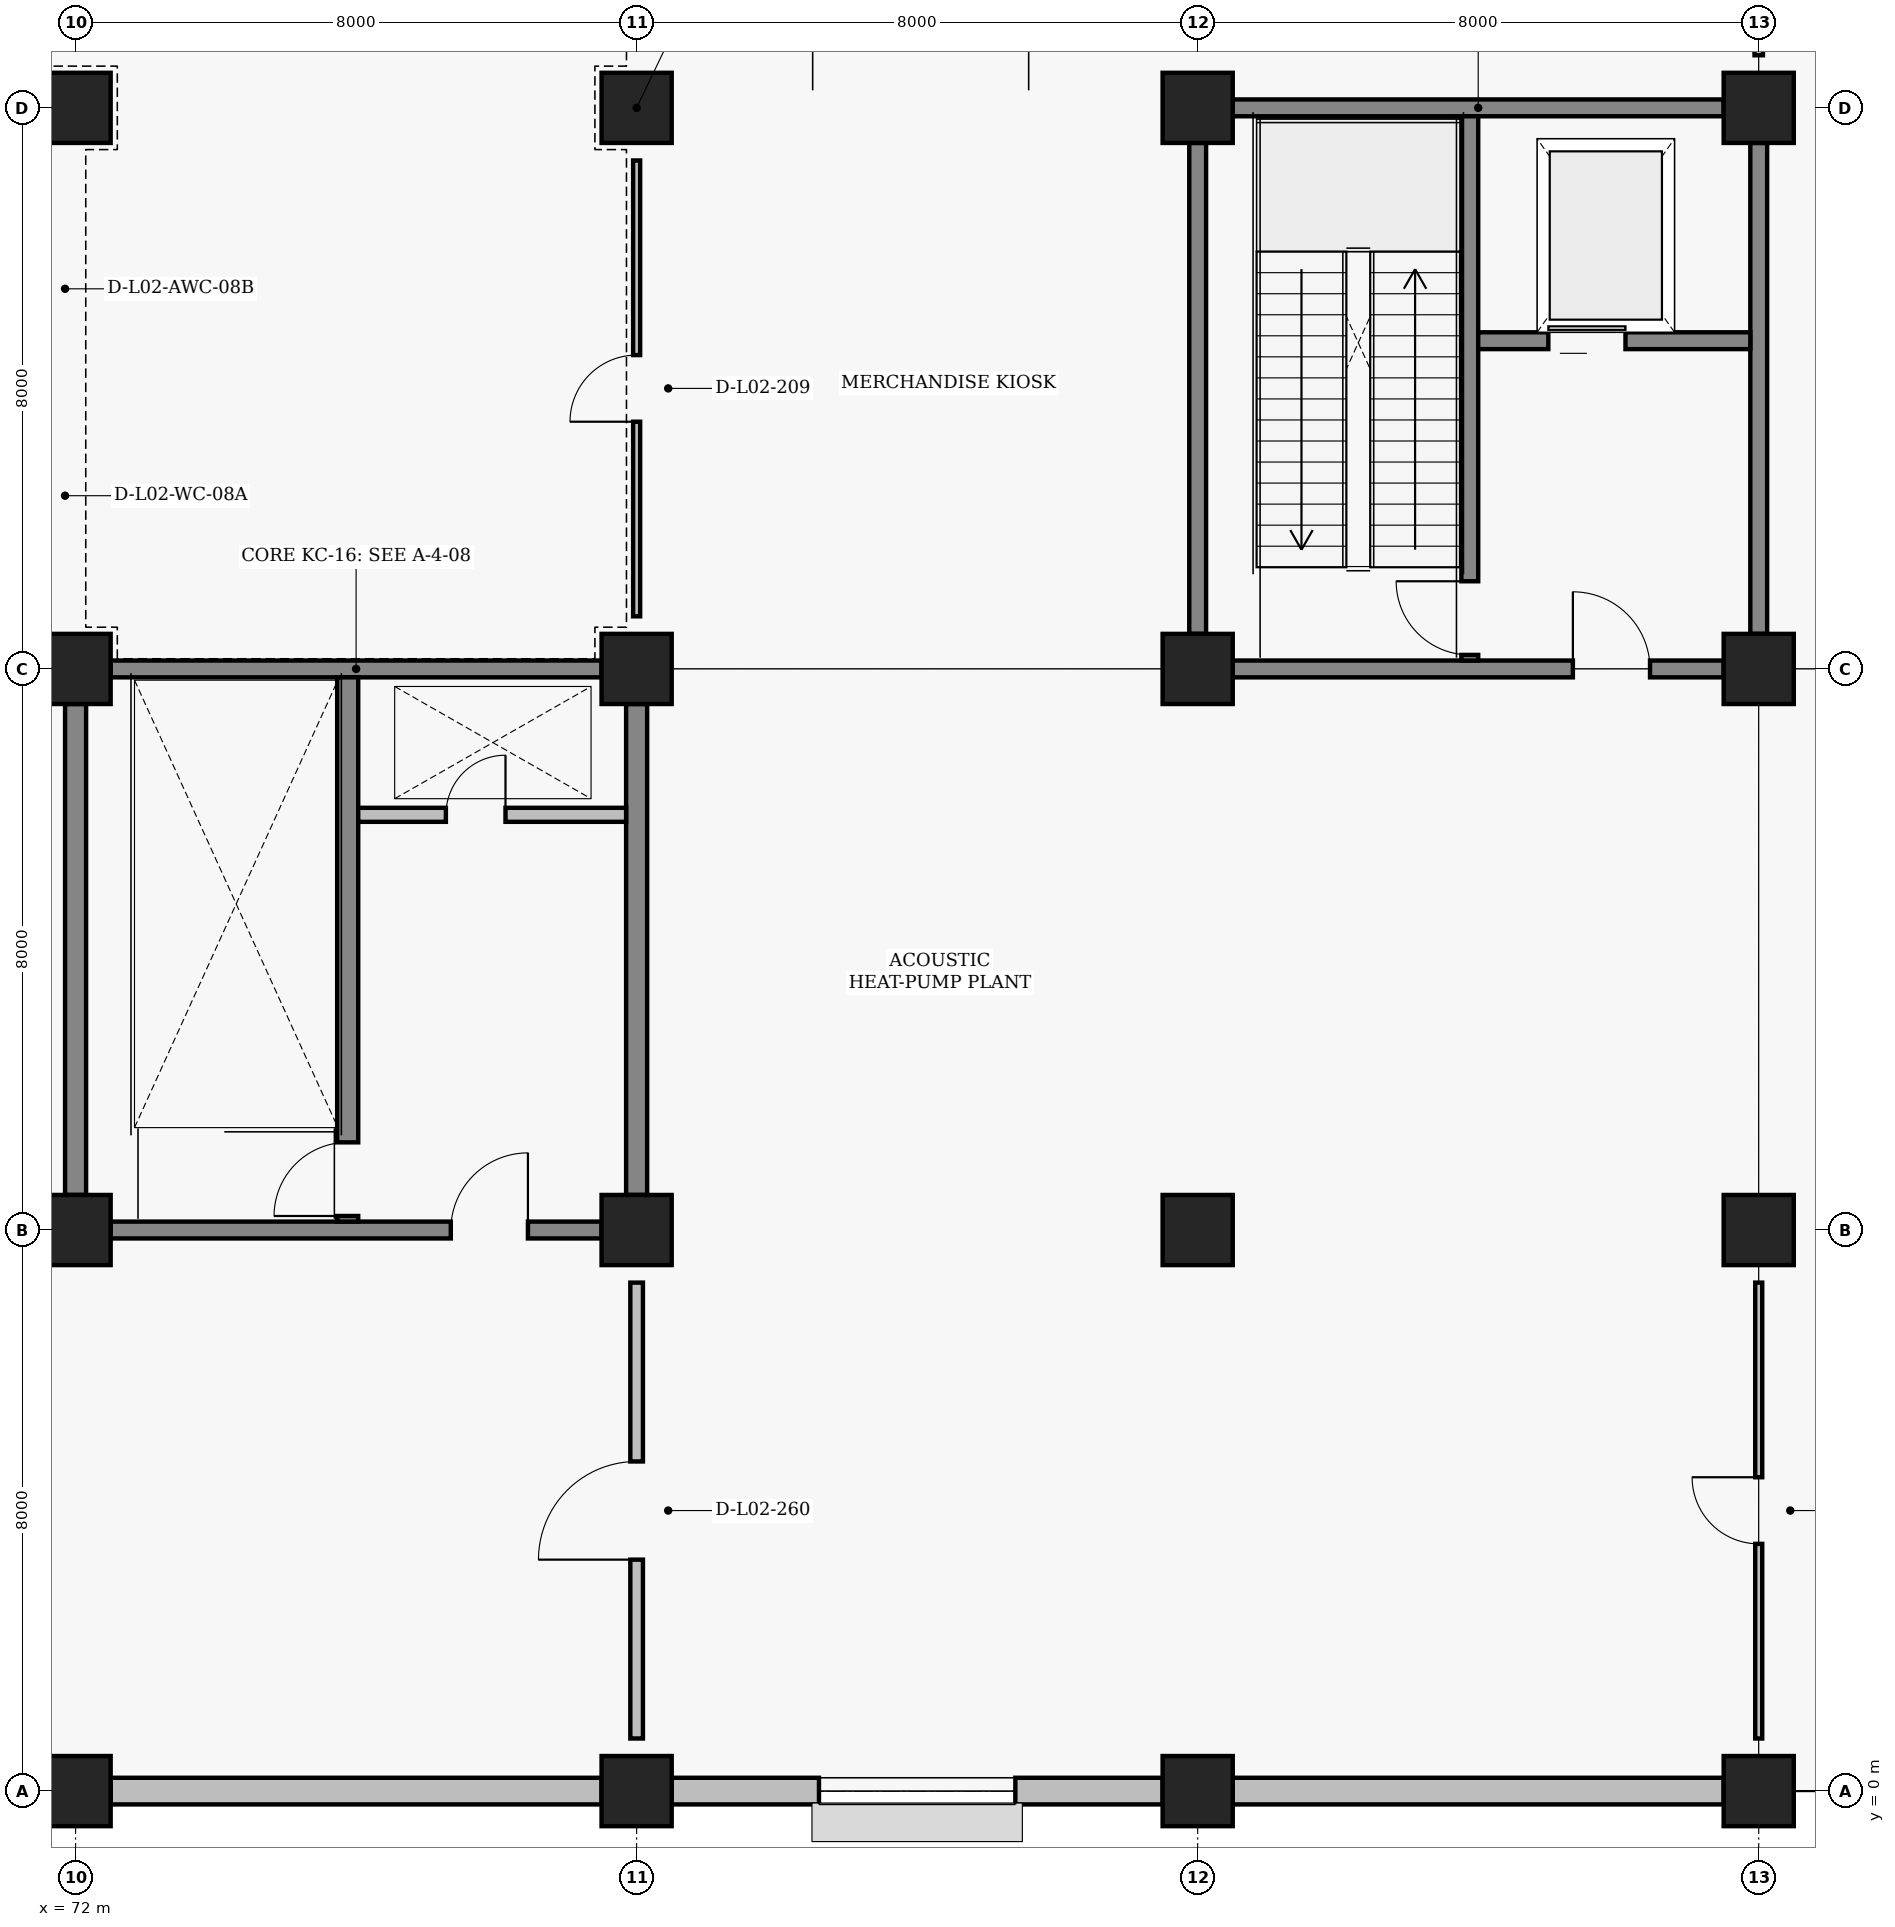
"""IFC4 building model, lengths in metres.
Left out: names, types, materials, properties, quantities, classifications, styles, units other than length and angle.
Written with IfcOpenShell. Run it as: python <this file> out.ifc"""

import sys

from ifc_helpers import new_model, si_unit, direction, frame, frame_2d, origin, origin_2d, place, context, subcontext, project, spatial, rectangle, extrude, element, fill, save


model = new_model("IFC4")
c1 = context("Model", 3, precision=1e-05, world=origin(), true_north=direction((0.0, 1.0)))
c2 = subcontext(c1, "Body", "Model", "MODEL_VIEW")
j1 = project(units=[si_unit("LENGTHUNIT", "METRE"), si_unit("PLANEANGLEUNIT", "RADIAN")], contexts=[c1])
p1 = place(None, origin())
s1 = spatial("IfcSite", under=j1, at=p1, CompositionType="ELEMENT")
p2 = place(p1, origin())
s2 = spatial("IfcBuilding", under=s1, at=p2, CompositionType="ELEMENT")
p3 = place(p2, frame((0.0, 0.0, 4.8)))
s3 = spatial("IfcBuildingStorey", under=s2, at=p3, CompositionType="ELEMENT", Elevation=4.8)
for number, where, z_axis, x_axis in (
    (1, (72.0, 0.0, 0.0), (0.0, 0.0, 1.0), (1.0, 0.0, 0.0)),
    (2, (72.0, 8.0, 0.0), (0.0, 0.0, 1.0), (1.0, 0.0, 0.0)),
    (3, (72.0, 16.0, 0.0), (0.0, 0.0, 1.0), (1.0, 0.0, 0.0)),
    (4, (72.0, 24.0, 0.0), (0.0, 0.0, 1.0), (1.0, 0.0, 0.0)),
    (5, (80.0, 0.0, 0.0), (0.0, 0.0, 1.0), (1.0, 0.0, 0.0)),
    (6, (80.0, 8.0, 0.0), (0.0, 0.0, 1.0), (1.0, 0.0, 0.0)),
    (7, (80.0, 16.0, 0.0), (0.0, 0.0, 1.0), (1.0, 0.0, 0.0)),
    (8, (80.0, 24.0, 0.0), (0.0, 0.0, 1.0), (1.0, 0.0, 0.0)),
    (9, (88.0, 0.0, 0.0), (0.0, 0.0, 1.0), (1.0, 0.0, 0.0)),
    (10, (88.0, 8.0, 0.0), (0.0, 0.0, 1.0), (1.0, 0.0, 0.0)),
    (11, (88.0, 16.0, 0.0), (0.0, 0.0, 1.0), (1.0, 0.0, 0.0)),
    (12, (88.0, 24.0, 0.0), (0.0, 0.0, 1.0), (1.0, 0.0, 0.0)),
    (13, (96.0, 0.0, 0.0), (0.0, 0.0, 1.0), (1.0, 0.0, 0.0)),
    (14, (96.0, 8.0, 0.0), (0.0, 0.0, 1.0), (1.0, 0.0, 0.0)),
    (15, (96.0, 16.0, 0.0), (0.0, 0.0, 1.0), (1.0, 0.0, 0.0)),
    (16, (96.0, 24.0, 0.0), (0.0, 0.0, 1.0), (1.0, 0.0, 0.0)),
):
    element("IfcColumn", number, at=place(p3, frame(where, z_axis=z_axis, x_axis=x_axis)), inside=s3, PredefinedType="COLUMN", context=c2, shape_type="SweptSolid", body=[
        extrude(rectangle(XDim=1.0, YDim=1.0, at=origin_2d()), origin(), (0.0, 0.0, 1.0), 4.8),
    ])
p4 = place(p3, frame((72.5, 0.0, 0.0), z_axis=(0.0, 0.0, 1.0), x_axis=(1.0, 0.0, 0.0)))
e17 = element("IfcWall", 17, at=p4, inside=s3, PredefinedType="SOLIDWALL", context=c2, shape_type="SweptSolid", body=[
    extrude(rectangle(XDim=7.0, YDim=0.38, at=frame_2d((3.5, 0.0))), origin(), (0.0, 0.0, 1.0), 3.95),
])
p5 = place(p3, frame((80.5, 0.0, 0.0), z_axis=(0.0, 0.0, 1.0), x_axis=(1.0, 0.0, 0.0)))
e18 = element("IfcWall", 18, at=p5, inside=s3, PredefinedType="SOLIDWALL", context=c2, shape_type="SweptSolid", body=[
    extrude(rectangle(XDim=7.0, YDim=0.38, at=frame_2d((3.5, 0.0))), origin(), (0.0, 0.0, 1.0), 3.95),
])
p6 = place(p5, frame((2.1, 0.0, 1.9)))
e19 = element("IfcOpeningElement", 19, at=p6, cuts=e18, PredefinedType="OPENING", context=c2, shape_type="SweptSolid", body=[
    extrude(rectangle(XDim=2.8, YDim=1.1, at=frame_2d((1.4, 0.55))), frame((0.0, 0.2, 0.0), z_axis=(0.0, -1.0, 0.0), x_axis=(1.0, 0.0, 0.0)), (0.0, 0.0, 1.0), 0.4),
])
p7 = place(p3, frame((88.5, 0.0, 0.0), z_axis=(0.0, 0.0, 1.0), x_axis=(1.0, 0.0, 0.0)))
e20 = element("IfcWall", 20, at=p7, inside=s3, PredefinedType="SOLIDWALL", context=c2, shape_type="SweptSolid", body=[
    extrude(rectangle(XDim=7.0, YDim=0.38, at=frame_2d((3.5, 0.0))), origin(), (0.0, 0.0, 1.0), 3.95),
])
p8 = place(p3, frame((88.5, 16.0, 0.0), z_axis=(0.0, 0.0, 1.0), x_axis=(1.0, 0.0, 0.0)))
e21 = element("IfcWall", 21, at=p8, inside=s3, PredefinedType="SHEAR", context=c2, shape_type="SweptSolid", body=[
    extrude(rectangle(XDim=7.0, YDim=0.24, at=frame_2d((3.5, 0.0))), origin(), (0.0, 0.0, 1.0), 3.61),
])
p9 = place(p8, frame((4.85, 0.0, 0.0)))
e22 = element("IfcOpeningElement", 22, at=p9, cuts=e21, PredefinedType="OPENING", context=c2, shape_type="SweptSolid", body=[
    extrude(rectangle(XDim=1.1, YDim=2.2, at=frame_2d((0.55, 1.1))), frame((0.0, 0.13, 0.0), z_axis=(0.0, -1.0, 0.0), x_axis=(1.0, 0.0, 0.0)), (0.0, 0.0, 1.0), 0.26),
])
p10 = place(p3, frame((88.5, 24.0, 0.0), z_axis=(0.0, 0.0, 1.0), x_axis=(1.0, 0.0, 0.0)))
e23 = element("IfcWall", 23, at=p10, inside=s3, PredefinedType="SHEAR", context=c2, shape_type="SweptSolid", body=[
    extrude(rectangle(XDim=7.0, YDim=0.24, at=frame_2d((3.5, 0.0))), origin(), (0.0, 0.0, 1.0), 3.91),
])
p11 = place(p3, frame((88.0, 16.5, 0.0), z_axis=(0.0, 0.0, 1.0), x_axis=(0.0, 1.0, 0.0)))
e24 = element("IfcWall", 24, at=p11, inside=s3, PredefinedType="SHEAR", context=c2, shape_type="SweptSolid", body=[
    extrude(rectangle(XDim=7.0, YDim=0.24, at=frame_2d((3.5, 0.0))), origin(), (0.0, 0.0, 1.0), 3.61),
])
p12 = place(p3, frame((96.0, 16.5, 0.0), z_axis=(0.0, 0.0, 1.0), x_axis=(0.0, 1.0, 0.0)))
e25 = element("IfcWall", 25, at=p12, inside=s3, PredefinedType="SHEAR", context=c2, shape_type="SweptSolid", body=[
    extrude(rectangle(XDim=7.0, YDim=0.24, at=frame_2d((3.5, 0.0))), origin(), (0.0, 0.0, 1.0), 3.91),
])
p13 = place(p3, frame((91.88, 16.12, 0.0), z_axis=(0.0, 0.0, 1.0), x_axis=(0.0, 1.0, 0.0)))
e26 = element("IfcWall", 26, at=p13, inside=s3, PredefinedType="SHEAR", context=c2, shape_type="SweptSolid", body=[
    extrude(rectangle(XDim=7.76, YDim=0.24, at=frame_2d((3.88, 0.0))), origin(), (0.0, 0.0, 1.0), 4.01),
])
p14 = place(p13, frame((0.08, 0.0, 0.0)))
e27 = element("IfcOpeningElement", 27, at=p14, cuts=e26, PredefinedType="OPENING", context=c2, shape_type="SweptSolid", body=[
    extrude(rectangle(XDim=1.05, YDim=2.15, at=frame_2d((0.525, 1.075))), frame((0.0, 0.13, 0.0), z_axis=(0.0, -1.0, 0.0), x_axis=(1.0, 0.0, 0.0)), (0.0, 0.0, 1.0), 0.26),
])
p15 = place(p3, frame((92.0, 20.68, 0.0), z_axis=(0.0, 0.0, 1.0), x_axis=(1.0, 0.0, 0.0)))
e28 = element("IfcWall", 28, at=p15, inside=s3, PredefinedType="SHEAR", context=c2, shape_type="SweptSolid", body=[
    extrude(rectangle(XDim=3.88, YDim=0.24, at=frame_2d((1.94, 0.0))), origin(), (0.0, 0.0, 1.0), 3.91),
])
p16 = place(p15, frame((1.0, 0.0, 0.0)))
e29 = element("IfcOpeningElement", 29, at=p16, cuts=e28, PredefinedType="OPENING", context=c2, shape_type="SweptSolid", body=[
    extrude(rectangle(XDim=1.1, YDim=2.15, at=frame_2d((0.55, 1.075))), frame((0.0, 0.13, 0.0), z_axis=(0.0, -1.0, 0.0), x_axis=(1.0, 0.0, 0.0)), (0.0, 0.0, 1.0), 0.26),
])
p17 = place(p3, frame((72.5, 8.0, 0.0), z_axis=(0.0, 0.0, 1.0), x_axis=(1.0, 0.0, 0.0)))
e30 = element("IfcWall", 30, at=p17, inside=s3, PredefinedType="SHEAR", context=c2, shape_type="SweptSolid", body=[
    extrude(rectangle(XDim=7.0, YDim=0.24, at=frame_2d((3.5, 0.0))), origin(), (0.0, 0.0, 1.0), 3.97),
])
p18 = place(p17, frame((4.85, 0.0, 0.0)))
e31 = element("IfcOpeningElement", 31, at=p18, cuts=e30, PredefinedType="OPENING", context=c2, shape_type="SweptSolid", body=[
    extrude(rectangle(XDim=1.1, YDim=2.2, at=frame_2d((0.55, 1.1))), frame((0.0, 0.13, 0.0), z_axis=(0.0, -1.0, 0.0), x_axis=(1.0, 0.0, 0.0)), (0.0, 0.0, 1.0), 0.26),
])
p19 = place(p3, frame((72.5, 16.0, 0.0), z_axis=(0.0, 0.0, 1.0), x_axis=(1.0, 0.0, 0.0)))
e32 = element("IfcWall", 32, at=p19, inside=s3, PredefinedType="SHEAR", context=c2, shape_type="SweptSolid", body=[
    extrude(rectangle(XDim=7.0, YDim=0.24, at=frame_2d((3.5, 0.0))), origin(), (0.0, 0.0, 1.0), 3.61),
])
p20 = place(p3, frame((72.0, 8.5, 0.0), z_axis=(0.0, 0.0, 1.0), x_axis=(0.0, 1.0, 0.0)))
e33 = element("IfcWall", 33, at=p20, inside=s3, PredefinedType="SHEAR", context=c2, shape_type="SweptSolid", body=[
    extrude(rectangle(XDim=7.0, YDim=0.3, at=frame_2d((3.5, 0.0))), origin(), (0.0, 0.0, 1.0), 3.91),
])
p21 = place(p3, frame((80.0, 8.5, 0.0), z_axis=(0.0, 0.0, 1.0), x_axis=(0.0, 1.0, 0.0)))
e34 = element("IfcWall", 34, at=p21, inside=s3, PredefinedType="SHEAR", context=c2, shape_type="SweptSolid", body=[
    extrude(rectangle(XDim=7.0, YDim=0.3, at=frame_2d((3.5, 0.0))), origin(), (0.0, 0.0, 1.0), 3.61),
])
p22 = place(p3, frame((75.88, 8.12, 0.0), z_axis=(0.0, 0.0, 1.0), x_axis=(0.0, 1.0, 0.0)))
e35 = element("IfcWall", 35, at=p22, inside=s3, PredefinedType="SHEAR", context=c2, shape_type="SweptSolid", body=[
    extrude(rectangle(XDim=7.76, YDim=0.3, at=frame_2d((3.88, 0.0))), origin(), (0.0, 0.0, 1.0), 4.01),
])
p23 = place(p22, frame((0.08, 0.0, 0.0)))
e36 = element("IfcOpeningElement", 36, at=p23, cuts=e35, PredefinedType="OPENING", context=c2, shape_type="SweptSolid", body=[
    extrude(rectangle(XDim=1.05, YDim=2.15, at=frame_2d((0.525, 1.075))), frame((0.0, 0.16, 0.0), z_axis=(0.0, -1.0, 0.0), x_axis=(1.0, 0.0, 0.0)), (0.0, 0.0, 1.0), 0.32),
])
p24 = place(p3, frame((76.03, 13.92, 0.0), z_axis=(0.0, 0.0, 1.0), x_axis=(1.0, 0.0, 0.0)))
e37 = element("IfcWall", 37, at=p24, inside=s3, PredefinedType="PARTITIONING", context=c2, shape_type="SweptSolid", body=[
    extrude(rectangle(XDim=3.82, YDim=0.2, at=frame_2d((1.91, 0.0))), origin(), (0.0, 0.0, 1.0), 3.97),
])
p25 = place(p24, frame((1.25, 0.0, 0.0)))
e38 = element("IfcOpeningElement", 38, at=p25, cuts=e37, PredefinedType="OPENING", context=c2, shape_type="SweptSolid", body=[
    extrude(rectangle(XDim=0.85, YDim=2.05, at=frame_2d((0.425, 1.025))), frame((0.0, 0.11, 0.0), z_axis=(0.0, -1.0, 0.0), x_axis=(1.0, 0.0, 0.0)), (0.0, 0.0, 1.0), 0.22),
])
p26 = place(p3, frame((80.0, 16.75, 0.0), z_axis=(0.0, 0.0, 1.0), x_axis=(0.0, 1.0, 0.0)))
e39 = element("IfcWall", 39, at=p26, inside=s3, PredefinedType="PARTITIONING", context=c2, shape_type="SweptSolid", body=[
    extrude(rectangle(XDim=6.5, YDim=0.1, at=frame_2d((3.25, 0.0))), origin(), (0.0, 0.0, 1.0), 3.91),
])
p27 = place(p26, frame((2.775, 0.0, 0.0)))
e40 = element("IfcOpeningElement", 40, at=p27, cuts=e39, PredefinedType="OPENING", context=c2, shape_type="SweptSolid", body=[
    extrude(rectangle(XDim=0.95, YDim=2.1, at=frame_2d((0.475, 1.05))), frame((0.0, 0.06, 0.0), z_axis=(0.0, -1.0, 0.0), x_axis=(1.0, 0.0, 0.0)), (0.0, 0.0, 1.0), 0.12),
])
p28 = place(p3, frame((96.0, 24.75, 0.0), z_axis=(0.0, 0.0, 1.0), x_axis=(0.0, 1.0, 0.0)))
e41 = element("IfcWall", 41, at=p28, inside=s3, PredefinedType="PARTITIONING", context=c2, shape_type="SweptSolid", body=[
    extrude(rectangle(XDim=6.5, YDim=0.12, at=frame_2d((3.25, 0.0))), origin(), (0.0, 0.0, 1.0), 3.91),
])
p29 = place(p28, frame((2.75, 0.0, 0.0)))
e42 = element("IfcOpeningElement", 42, at=p29, cuts=e41, PredefinedType="OPENING", context=c2, shape_type="SweptSolid", body=[
    extrude(rectangle(XDim=1.0, YDim=2.1, at=frame_2d((0.5, 1.05))), frame((0.0, 0.07, 0.0), z_axis=(0.0, -1.0, 0.0), x_axis=(1.0, 0.0, 0.0)), (0.0, 0.0, 1.0), 0.14),
])
p30 = place(p3, frame((80.0, 0.75, 0.0), z_axis=(0.0, 0.0, 1.0), x_axis=(0.0, 1.0, 0.0)))
e43 = element("IfcWall", 43, at=p30, inside=s3, PredefinedType="PARTITIONING", context=c2, shape_type="SweptSolid", body=[
    extrude(rectangle(XDim=6.5, YDim=0.18, at=frame_2d((3.25, 0.0))), origin(), (0.0, 0.0, 1.0), 3.97),
])
p31 = place(p30, frame((2.55, 0.0, 0.0)))
e44 = element("IfcOpeningElement", 44, at=p31, cuts=e43, PredefinedType="OPENING", context=c2, shape_type="SweptSolid", body=[
    extrude(rectangle(XDim=1.4, YDim=2.2, at=frame_2d((0.7, 1.1))), frame((0.0, 0.1, 0.0), z_axis=(0.0, -1.0, 0.0), x_axis=(1.0, 0.0, 0.0)), (0.0, 0.0, 1.0), 0.2),
])
p32 = place(p3, frame((96.0, 0.75, 0.0), z_axis=(0.0, 0.0, 1.0), x_axis=(0.0, 1.0, 0.0)))
e45 = element("IfcWall", 45, at=p32, inside=s3, PredefinedType="PARTITIONING", context=c2, shape_type="SweptSolid", body=[
    extrude(rectangle(XDim=6.5, YDim=0.1, at=frame_2d((3.25, 0.0))), origin(), (0.0, 0.0, 1.0), 3.97),
])
p33 = place(p32, frame((2.775, 0.0, 0.0)))
e46 = element("IfcOpeningElement", 46, at=p33, cuts=e45, PredefinedType="OPENING", context=c2, shape_type="SweptSolid", body=[
    extrude(rectangle(XDim=0.95, YDim=2.1, at=frame_2d((0.475, 1.05))), frame((0.0, 0.06, 0.0), z_axis=(0.0, -1.0, 0.0), x_axis=(1.0, 0.0, 0.0)), (0.0, 0.0, 1.0), 0.12),
])
p34 = place(p6, origin())
e47 = element("IfcWindow", 47, at=p34, inside=s3, PartitioningType="SINGLE_PANEL", PredefinedType="LIGHTDOME", context=c2, shape_type="SweptSolid", body=[
    extrude(rectangle(XDim=2.8, YDim=1.1, at=frame_2d((1.4, 0.55))), frame((0.0, 0.03, 0.0), z_axis=(0.0, -1.0, 0.0), x_axis=(1.0, 0.0, 0.0)), (0.0, 0.0, 1.0), 0.06),
])
fill(e19, e47)
p35 = place(p9, origin())
e48 = element("IfcDoor", 48, at=p35, inside=s3, OperationType="SINGLE_SWING_LEFT", PredefinedType="DOOR", context=c2, shape_type="SweptSolid", body=[
    extrude(rectangle(XDim=1.1, YDim=2.2, at=frame_2d((0.55, 1.1))), frame((0.0, 0.025, 0.0), z_axis=(0.0, -1.0, 0.0), x_axis=(1.0, 0.0, 0.0)), (0.0, 0.0, 1.0), 0.05),
])
fill(e22, e48)
p36 = place(p14, origin())
e49 = element("IfcDoor", 49, at=p36, inside=s3, OperationType="SINGLE_SWING_RIGHT", PredefinedType="DOOR", context=c2, shape_type="SweptSolid", body=[
    extrude(rectangle(XDim=1.05, YDim=2.15, at=frame_2d((0.525, 1.075))), frame((0.0, 0.025, 0.0), z_axis=(0.0, -1.0, 0.0), x_axis=(1.0, 0.0, 0.0)), (0.0, 0.0, 1.0), 0.05),
])
fill(e27, e49)
p37 = place(p16, origin())
e50 = element("IfcDoor", 50, at=p37, inside=s3, OperationType="SLIDING_TO_LEFT", PredefinedType="DOOR", context=c2, shape_type="SweptSolid", body=[
    extrude(rectangle(XDim=1.1, YDim=2.15, at=frame_2d((0.55, 1.075))), frame((0.0, 0.025, 0.0), z_axis=(0.0, -1.0, 0.0), x_axis=(1.0, 0.0, 0.0)), (0.0, 0.0, 1.0), 0.05),
])
fill(e29, e50)
p38 = place(p18, origin())
e51 = element("IfcDoor", 51, at=p38, inside=s3, OperationType="SINGLE_SWING_RIGHT", PredefinedType="DOOR", context=c2, shape_type="SweptSolid", body=[
    extrude(rectangle(XDim=1.1, YDim=2.2, at=frame_2d((0.55, 1.1))), frame((0.0, 0.025, 0.0), z_axis=(0.0, -1.0, 0.0), x_axis=(1.0, 0.0, 0.0)), (0.0, 0.0, 1.0), 0.05),
])
fill(e31, e51)
p39 = place(p23, origin())
e52 = element("IfcDoor", 52, at=p39, inside=s3, OperationType="SINGLE_SWING_LEFT", PredefinedType="DOOR", context=c2, shape_type="SweptSolid", body=[
    extrude(rectangle(XDim=1.05, YDim=2.15, at=frame_2d((0.525, 1.075))), frame((0.0, 0.025, 0.0), z_axis=(0.0, -1.0, 0.0), x_axis=(1.0, 0.0, 0.0)), (0.0, 0.0, 1.0), 0.05),
])
fill(e36, e52)
p40 = place(p25, origin())
e53 = element("IfcDoor", 53, at=p40, inside=s3, OperationType="SINGLE_SWING_RIGHT", PredefinedType="TRAPDOOR", context=c2, shape_type="SweptSolid", body=[
    extrude(rectangle(XDim=0.85, YDim=2.05, at=frame_2d((0.425, 1.025))), frame((0.0, 0.025, 0.0), z_axis=(0.0, -1.0, 0.0), x_axis=(1.0, 0.0, 0.0)), (0.0, 0.0, 1.0), 0.05),
])
fill(e38, e53)
p41 = place(p27, origin())
e54 = element("IfcDoor", 54, at=p41, inside=s3, OperationType="SINGLE_SWING_LEFT", PredefinedType="DOOR", context=c2, shape_type="SweptSolid", body=[
    extrude(rectangle(XDim=0.95, YDim=2.1, at=frame_2d((0.475, 1.05))), frame((0.0, 0.025, 0.0), z_axis=(0.0, -1.0, 0.0), x_axis=(1.0, 0.0, 0.0)), (0.0, 0.0, 1.0), 0.05),
])
fill(e40, e54)
p42 = place(p31, origin())
e55 = element("IfcDoor", 55, at=p42, inside=s3, OperationType="SINGLE_SWING_LEFT", PredefinedType="DOOR", context=c2, shape_type="SweptSolid", body=[
    extrude(rectangle(XDim=1.4, YDim=2.2, at=frame_2d((0.7, 1.1))), frame((0.0, 0.025, 0.0), z_axis=(0.0, -1.0, 0.0), x_axis=(1.0, 0.0, 0.0)), (0.0, 0.0, 1.0), 0.05),
])
fill(e44, e55)
p43 = place(p33, origin())
e56 = element("IfcDoor", 56, at=p43, inside=s3, OperationType="SINGLE_SWING_RIGHT", PredefinedType="DOOR", context=c2, shape_type="SweptSolid", body=[
    extrude(rectangle(XDim=0.95, YDim=2.1, at=frame_2d((0.475, 1.05))), frame((0.0, 0.025, 0.0), z_axis=(0.0, -1.0, 0.0), x_axis=(1.0, 0.0, 0.0)), (0.0, 0.0, 1.0), 0.05),
])
fill(e46, e56)
save(model, sys.argv[1])
